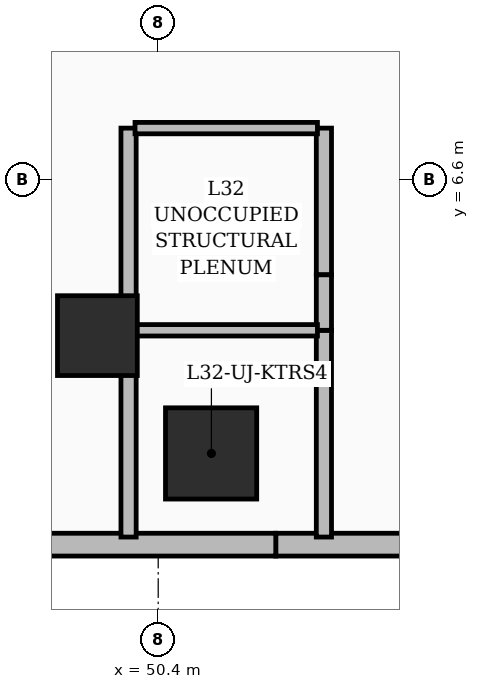
"""IFC4 building model, lengths in metres.
Left out: names, types, materials, properties, quantities, classifications, styles, units other than length and angle.
Written with IfcOpenShell. Run it as: python <this file> out.ifc"""

import sys

from ifc_helpers import new_model, si_unit, direction, frame, frame_2d, origin, origin_2d, place, context, subcontext, project, spatial, rectangle, extrude, element, save


model = new_model("IFC4")
c1 = context("Model", 3, precision=1e-05, world=origin(), true_north=direction((0.0, 1.0)))
c2 = subcontext(c1, "Body", "Model", "MODEL_VIEW")
j1 = project(units=[si_unit("LENGTHUNIT", "METRE"), si_unit("PLANEANGLEUNIT", "RADIAN")], contexts=[c1])
p1 = place(None, origin())
s1 = spatial("IfcSite", under=j1, at=p1, CompositionType="ELEMENT")
p2 = place(p1, origin())
s2 = spatial("IfcBuilding", under=s1, at=p2, CompositionType="ELEMENT")
p3 = place(p2, frame((0.0, 0.0, 128.4)))
s3 = spatial("IfcBuildingStorey", under=s2, at=p3, CompositionType="ELEMENT", Elevation=128.4)
p4 = place(p3, frame((49.6, 4.55, 0.0), z_axis=(0.0, 0.0, 1.0), x_axis=(1.0, 0.0, 0.0)))
e1 = element("IfcColumn", 1, at=p4, inside=s3, PredefinedType="COLUMN", context=c2, shape_type="SweptSolid", body=[
    extrude(rectangle(XDim=1.05, YDim=1.05, at=origin_2d()), origin(), (0.0, 0.0, 1.0), 3.6),
])
p5 = place(p3, frame((51.096, 3.0, 0.0), z_axis=(0.0, 0.0, 1.0), x_axis=(1.0, 0.0, 0.0)))
e2 = element("IfcColumn", 2, at=p5, inside=s3, PredefinedType="COLUMN", context=c2, shape_type="SweptSolid", body=[
    extrude(rectangle(XDim=1.2, YDim=1.2, at=origin_2d()), origin(), (0.0, 0.0, 1.0), 3.6),
])
p6 = place(p3, frame((58.35, 1.8, 0.0), z_axis=(0.0, 0.0, 1.0), x_axis=(-1.0, 0.0, 0.0)))
e3 = element("IfcWall", 3, at=p6, inside=s3, PredefinedType="SOLIDWALL", context=c2, shape_type="SweptSolid", body=[
    extrude(rectangle(XDim=6.403, YDim=0.3, at=frame_2d((3.202, 0.0))), origin(), (0.0, 0.0, 1.0), 3.35),
])
p7 = place(p6, frame((3.335, 0.0, 0.8)))
e4 = element("IfcOpeningElement", 4, at=p7, cuts=e3, PredefinedType="OPENING", context=c2, shape_type="SweptSolid", body=[
    extrude(rectangle(XDim=1.2, YDim=1.8, at=frame_2d((0.6, 0.9))), frame((0.0, 0.16, 0.0), z_axis=(0.0, -1.0, 0.0), x_axis=(1.0, 0.0, 0.0)), (0.0, 0.0, 1.0), 0.32),
])
p8 = place(p3, frame((51.947, 1.8, 0.0), z_axis=(0.0, 0.0, 1.0), x_axis=(-1.0, 0.0, 0.0)))
e5 = element("IfcWall", 5, at=p8, inside=s3, PredefinedType="SOLIDWALL", context=c2, shape_type="SweptSolid", body=[
    extrude(rectangle(XDim=6.993, YDim=0.3, at=frame_2d((3.497, 0.0))), origin(), (0.0, 0.0, 1.0), 3.35),
])
p9 = place(p8, frame((3.075, 0.0, 0.6)))
e6 = element("IfcOpeningElement", 6, at=p9, cuts=e5, PredefinedType="OPENING", context=c2, shape_type="SweptSolid", body=[
    extrude(rectangle(XDim=2.4, YDim=2.1, at=frame_2d((1.2, 1.05))), frame((0.0, 0.16, 0.0), z_axis=(0.0, -1.0, 0.0), x_axis=(1.0, 0.0, 0.0)), (0.0, 0.0, 1.0), 0.32),
])
p10 = place(p3, frame((50.01, 1.9, 0.0), z_axis=(0.0, 0.0, 1.0), x_axis=(0.0, 1.0, 0.0)))
e7 = element("IfcWall", 7, at=p10, inside=s3, PredefinedType="PARTITIONING", context=c2, shape_type="SweptSolid", body=[
    extrude(rectangle(XDim=2.72, YDim=0.2, at=frame_2d((1.36, 0.0))), origin(), (0.0, 0.0, 1.0), 1.12),
])
p11 = place(p3, frame((50.01, 4.62, 0.0), z_axis=(0.0, 0.0, 1.0), x_axis=(0.0, 1.0, 0.0)))
e8 = element("IfcWall", 8, at=p11, inside=s3, PredefinedType="PARTITIONING", context=c2, shape_type="SweptSolid", body=[
    extrude(rectangle(XDim=2.66, YDim=0.2, at=frame_2d((1.33, 0.0))), origin(), (0.0, 0.0, 1.0), 3.35),
])
p12 = place(p3, frame((52.58, 7.28, 0.0), z_axis=(0.0, 0.0, 1.0), x_axis=(0.0, -1.0, 0.0)))
e9 = element("IfcWall", 9, at=p12, inside=s3, PredefinedType="PARTITIONING", context=c2, shape_type="SweptSolid", body=[
    extrude(rectangle(XDim=1.93, YDim=0.2, at=frame_2d((0.965, 0.0))), origin(), (0.0, 0.0, 1.0), 2.57),
])
p13 = place(p3, frame((52.58, 4.62, 0.0), z_axis=(0.0, 0.0, 1.0), x_axis=(0.0, -1.0, 0.0)))
e10 = element("IfcWall", 10, at=p13, inside=s3, PredefinedType="PARTITIONING", context=c2, shape_type="SweptSolid", body=[
    extrude(rectangle(XDim=2.72, YDim=0.2, at=frame_2d((1.36, 0.0))), origin(), (0.0, 0.0, 1.0), 3.35),
])
p14 = place(p3, frame((52.58, 5.35, 0.0), z_axis=(0.0, 0.0, 1.0), x_axis=(0.0, -1.0, 0.0)))
e11 = element("IfcWall", 11, at=p14, inside=s3, PredefinedType="PARTITIONING", context=c2, shape_type="SweptSolid", body=[
    extrude(rectangle(XDim=0.73, YDim=0.2, at=frame_2d((0.365, 0.0))), origin(), (0.0, 0.0, 1.0), 2.57),
])
p15 = place(p3, frame((50.095, 7.28, 0.0), z_axis=(0.0, 0.0, 1.0), x_axis=(1.0, 0.0, 0.0)))
e12 = element("IfcWall", 12, at=p15, inside=s3, PredefinedType="PARTITIONING", context=c2, shape_type="SweptSolid", body=[
    extrude(rectangle(XDim=2.4, YDim=0.15, at=frame_2d((1.2, 0.0))), origin(), (0.0, 0.0, 1.0), 3.35),
])
p16 = place(p3, frame((52.495, 4.62, 0.0), z_axis=(0.0, 0.0, 1.0), x_axis=(-1.0, 0.0, 0.0)))
e13 = element("IfcWall", 13, at=p16, inside=s3, PredefinedType="PARTITIONING", context=c2, shape_type="SweptSolid", body=[
    extrude(rectangle(XDim=2.4, YDim=0.15, at=frame_2d((1.2, 0.0))), origin(), (0.0, 0.0, 1.0), 2.57),
])
save(model, sys.argv[1])
